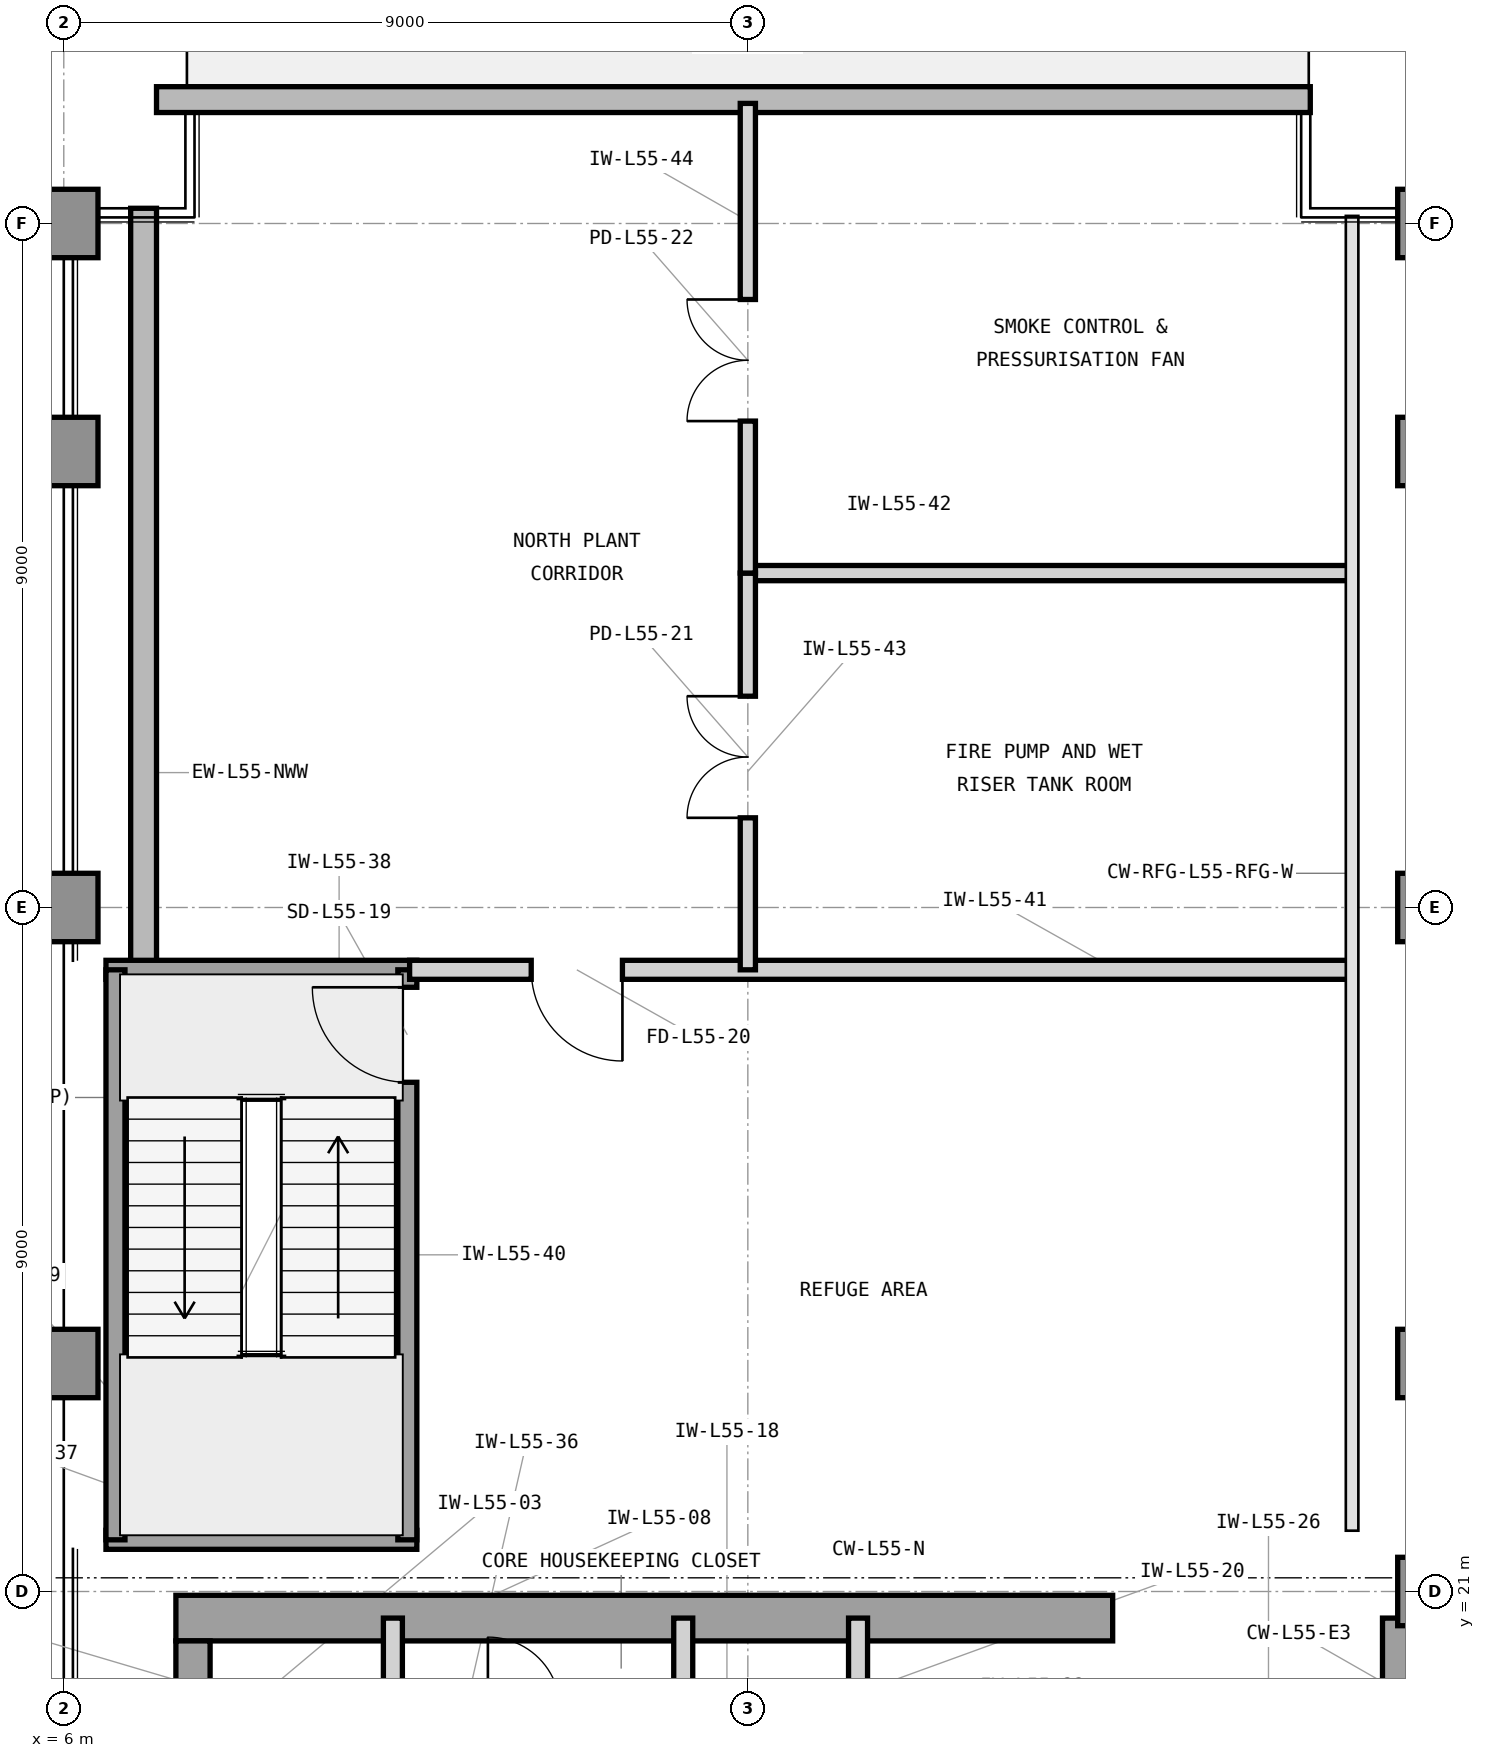
"""IFC4 building model, lengths in metres.
Left out: names, types, materials, properties, quantities, classifications, styles, units other than length and angle.
Written with IfcOpenShell. Run it as: python <this file> out.ifc"""

import sys

from ifc_helpers import new_model, si_unit, direction, frame, frame_2d, origin, origin_2d, place, context, subcontext, project, spatial, rectangle, extrude, element, fill, save


model = new_model("IFC4")
c1 = context("Model", 3, precision=1e-05, world=origin(), true_north=direction((0.0, 1.0)))
c2 = subcontext(c1, "Body", "Model", "MODEL_VIEW")
j1 = project(units=[si_unit("LENGTHUNIT", "METRE"), si_unit("PLANEANGLEUNIT", "RADIAN")], contexts=[c1])
p1 = place(None, origin())
s1 = spatial("IfcSite", under=j1, at=p1, CompositionType="ELEMENT")
p2 = place(p1, origin())
s2 = spatial("IfcBuilding", under=s1, at=p2, CompositionType="ELEMENT")
p3 = place(p2, frame((0.0, 0.0, 226.8)))
s3 = spatial("IfcBuildingStorey", under=s2, at=p3, CompositionType="ELEMENT", Elevation=226.8)
p4 = place(p3, frame((7.475, 20.65, 0.0), z_axis=(0.0, 0.0, 1.0), x_axis=(1.0, 0.0, 0.0)))
e1 = element("IfcWall", 1, at=p4, inside=s3, PredefinedType="SHEAR", context=c2, shape_type="SweptSolid", body=[
    extrude(rectangle(XDim=12.325, YDim=0.6, at=frame_2d((6.163, 0.0))), origin(), (0.0, 0.0, 1.0), 4.5),
])
p5 = place(p3, frame((23.65, 16.6, 0.0), z_axis=(0.0, 0.0, 1.0), x_axis=(0.0, 1.0, 0.0)))
e2 = element("IfcWall", 2, at=p5, inside=s3, PredefinedType="SHEAR", context=c2, shape_type="SweptSolid", body=[
    extrude(rectangle(XDim=4.05, YDim=0.6, at=frame_2d((2.025, 0.0))), origin(), (0.0, 0.0, 1.0), 4.5),
])
p6 = place(p3, frame((7.7, 19.575, 0.0), z_axis=(0.0, 0.0, 1.0), x_axis=(0.0, 1.0, 0.0)))
e3 = element("IfcWall", 3, at=p6, inside=s3, PredefinedType="SHEAR", context=c2, shape_type="SweptSolid", body=[
    extrude(rectangle(XDim=0.775, YDim=0.45, at=frame_2d((0.388, 0.0))), origin(), (0.0, 0.0, 1.0), 4.5),
])
for number, where, z_axis, x_axis in (
    (4, (24.0, 21.0, 0.0), (0.0, 0.0, 1.0), (1.0, 0.0, 0.0)),
    (5, (6.0, 24.0, 0.0), (0.0, 0.0, 1.0), (1.0, 0.0, 0.0)),
    (6, (24.0, 24.0, 0.0), (0.0, 0.0, 1.0), (1.0, 0.0, 0.0)),
    (7, (6.0, 30.0, 0.0), (0.0, 0.0, 1.0), (1.0, 0.0, 0.0)),
    (8, (24.0, 30.0, 0.0), (0.0, 0.0, 1.0), (1.0, 0.0, 0.0)),
    (9, (6.0, 36.0, 0.0), (0.0, 0.0, 1.0), (1.0, 0.0, 0.0)),
    (10, (24.0, 36.0, 0.0), (0.0, 0.0, 1.0), (1.0, 0.0, 0.0)),
    (11, (6.0, 39.0, 0.0), (0.0, 0.0, 1.0), (1.0, 0.0, 0.0)),
    (12, (24.0, 39.0, 0.0), (0.0, 0.0, 1.0), (1.0, 0.0, 0.0)),
):
    element("IfcColumn", number, at=place(p3, frame(where, z_axis=z_axis, x_axis=x_axis)), inside=s3, PredefinedType="COLUMN", context=c2, shape_type="SweptSolid", body=[
        extrude(rectangle(XDim=0.9, YDim=0.9, at=origin_2d()), origin(), (0.0, 0.0, 1.0), 4.5),
    ])
p7 = place(p3, frame((7.05, 39.2, 0.0), z_axis=(0.0, 0.0, 1.0), x_axis=(0.0, -1.0, 0.0)))
e13 = element("IfcWall", 13, at=p7, inside=s3, PredefinedType="STANDARD", context=c2, shape_type="SweptSolid", body=[
    extrude(rectangle(XDim=9.9, YDim=0.34, at=frame_2d((4.95, 0.0))), origin(), (0.0, 0.0, 1.0), 4.3),
])
p8 = place(p3, frame((22.4, 40.63, 0.0), z_axis=(0.0, 0.0, 1.0), x_axis=(-1.0, 0.0, 0.0)))
e14 = element("IfcWall", 14, at=p8, inside=s3, PredefinedType="STANDARD", context=c2, shape_type="SweptSolid", body=[
    extrude(rectangle(XDim=15.18, YDim=0.34, at=frame_2d((7.59, 0.0))), origin(), (0.0, 0.0, 1.0), 4.3),
])
p9 = place(p3, frame((10.33, 19.45, 0.0), z_axis=(0.0, 0.0, 1.0), x_axis=(0.0, 1.0, 0.0)))
e15 = element("IfcWall", 15, at=p9, inside=s3, PredefinedType="PARTITIONING", context=c2, shape_type="SweptSolid", body=[
    extrude(rectangle(XDim=1.2, YDim=0.25, at=frame_2d((0.6, 0.0))), origin(), (0.0, 0.0, 1.0), 4.29),
])
for number, where, z_axis, x_axis in (
    (16, (14.15, 16.7, 0.0), (0.0, 0.0, 1.0), (0.0, 1.0, 0.0)),
    (17, (16.45, 16.7, 0.0), (0.0, 0.0, 1.0), (0.0, 1.0, 0.0)),
):
    element("IfcWall", number, at=place(p3, frame(where, z_axis=z_axis, x_axis=x_axis)), inside=s3, PredefinedType="PARTITIONING", context=c2, shape_type="SweptSolid", body=[
        extrude(rectangle(XDim=3.95, YDim=0.25, at=frame_2d((1.975, 0.0))), origin(), (0.0, 0.0, 1.0), 4.29),
    ])
for number, where, z_axis, x_axis in (
    (18, (6.555, 21.68, 0.0), (0.0, 0.0, 1.0), (1.0, 0.0, 0.0)),
    (19, (6.555, 29.18, 0.0), (0.0, 0.0, 1.0), (1.0, 0.0, 0.0)),
):
    element("IfcWall", number, at=place(p3, frame(where, z_axis=z_axis, x_axis=x_axis)), inside=s3, PredefinedType="SHEAR", context=c2, shape_type="SweptSolid", body=[
        extrude(rectangle(XDim=4.09, YDim=0.25, at=frame_2d((2.045, 0.0))), origin(), (0.0, 0.0, 1.0), 4.5),
    ])
p10 = place(p3, frame((6.68, 21.68, 0.0), z_axis=(0.0, 0.0, 1.0), x_axis=(0.0, 1.0, 0.0)))
e20 = element("IfcWall", 20, at=p10, inside=s3, PredefinedType="SHEAR", context=c2, shape_type="SweptSolid", body=[
    extrude(rectangle(XDim=7.5, YDim=0.25, at=frame_2d((3.75, 0.0))), origin(), (0.0, 0.0, 1.0), 4.5),
])
p11 = place(p3, frame((10.52, 21.68, 0.0), z_axis=(0.0, 0.0, 1.0), x_axis=(0.0, 1.0, 0.0)))
e21 = element("IfcWall", 21, at=p11, inside=s3, PredefinedType="SHEAR", context=c2, shape_type="SweptSolid", body=[
    extrude(rectangle(XDim=7.5, YDim=0.25, at=frame_2d((3.75, 0.0))), origin(), (0.0, 0.0, 1.0), 4.5),
])
p12 = place(p11, frame((6.02, 0.0, 0.0)))
e22 = element("IfcOpeningElement", 22, at=p12, cuts=e21, PredefinedType="OPENING", context=c2, shape_type="SweptSolid", body=[
    extrude(rectangle(XDim=1.25, YDim=2.2, at=frame_2d((0.625, 1.1))), frame((0.0, 0.135, 0.0), z_axis=(0.0, -1.0, 0.0), x_axis=(1.0, 0.0, 0.0)), (0.0, 0.0, 1.0), 0.27),
])
p13 = place(p3, frame((10.55, 29.18, 0.0), z_axis=(0.0, 0.0, 1.0), x_axis=(1.0, 0.0, 0.0)))
e23 = element("IfcWall", 23, at=p13, inside=s3, PredefinedType="PARTITIONING", context=c2, shape_type="SweptSolid", body=[
    extrude(rectangle(XDim=12.4, YDim=0.25, at=frame_2d((6.2, 0.0))), origin(), (0.0, 0.0, 1.0), 4.29),
])
p14 = place(p13, frame((1.6, 0.0, 0.0)))
e24 = element("IfcOpeningElement", 24, at=p14, cuts=e23, PredefinedType="OPENING", context=c2, shape_type="SweptSolid", body=[
    extrude(rectangle(XDim=1.2, YDim=2.2, at=frame_2d((0.6, 1.1))), frame((0.0, 0.135, 0.0), z_axis=(0.0, -1.0, 0.0), x_axis=(1.0, 0.0, 0.0)), (0.0, 0.0, 1.0), 0.27),
])
p15 = place(p3, frame((15.0, 34.4, 0.0), z_axis=(0.0, 0.0, 1.0), x_axis=(1.0, 0.0, 0.0)))
e25 = element("IfcWall", 25, at=p15, inside=s3, PredefinedType="PARTITIONING", context=c2, shape_type="SweptSolid", body=[
    extrude(rectangle(XDim=7.95, YDim=0.2, at=frame_2d((3.975, 0.0))), origin(), (0.0, 0.0, 1.0), 4.29),
])
p16 = place(p3, frame((15.0, 29.18, 0.0), z_axis=(0.0, 0.0, 1.0), x_axis=(0.0, 1.0, 0.0)))
e26 = element("IfcWall", 26, at=p16, inside=s3, PredefinedType="PARTITIONING", context=c2, shape_type="SweptSolid", body=[
    extrude(rectangle(XDim=5.22, YDim=0.2, at=frame_2d((2.61, 0.0))), origin(), (0.0, 0.0, 1.0), 3.886),
])
p17 = place(p16, frame((2.0, 0.0, 0.0)))
e27 = element("IfcOpeningElement", 27, at=p17, cuts=e26, PredefinedType="OPENING", context=c2, shape_type="SweptSolid", body=[
    extrude(rectangle(XDim=1.6, YDim=2.3, at=frame_2d((0.8, 1.15))), frame((0.0, 0.11, 0.0), z_axis=(0.0, -1.0, 0.0), x_axis=(1.0, 0.0, 0.0)), (0.0, 0.0, 1.0), 0.22),
])
p18 = place(p3, frame((15.0, 34.4, 0.0), z_axis=(0.0, 0.0, 1.0), x_axis=(0.0, 1.0, 0.0)))
e28 = element("IfcWall", 28, at=p18, inside=s3, PredefinedType="PARTITIONING", context=c2, shape_type="SweptSolid", body=[
    extrude(rectangle(XDim=6.18, YDim=0.2, at=frame_2d((3.09, 0.0))), origin(), (0.0, 0.0, 1.0), 3.886),
])
p19 = place(p18, frame((2.0, 0.0, 0.0)))
e29 = element("IfcOpeningElement", 29, at=p19, cuts=e28, PredefinedType="OPENING", context=c2, shape_type="SweptSolid", body=[
    extrude(rectangle(XDim=1.6, YDim=2.3, at=frame_2d((0.8, 1.15))), frame((0.0, 0.11, 0.0), z_axis=(0.0, -1.0, 0.0), x_axis=(1.0, 0.0, 0.0)), (0.0, 0.0, 1.0), 0.22),
])
p20 = place(p12, origin())
e30 = element("IfcDoor", 30, at=p20, inside=s3, OperationType="SINGLE_SWING_RIGHT", PredefinedType="DOOR", context=c2, shape_type="SweptSolid", body=[
    extrude(rectangle(XDim=1.25, YDim=2.2, at=frame_2d((0.625, 1.1))), frame((0.0, 0.025, 0.0), z_axis=(0.0, -1.0, 0.0), x_axis=(1.0, 0.0, 0.0)), (0.0, 0.0, 1.0), 0.05),
])
fill(e22, e30)
p21 = place(p14, frame((1.2, 0.0, 0.0), z_axis=(0.0, 0.0, 1.0), x_axis=(-1.0, 0.0, 0.0)))
e31 = element("IfcDoor", 31, at=p21, inside=s3, OperationType="SINGLE_SWING_LEFT", PredefinedType="DOOR", context=c2, shape_type="SweptSolid", body=[
    extrude(rectangle(XDim=1.2, YDim=2.2, at=frame_2d((0.6, 1.1))), frame((0.0, 0.025, 0.0), z_axis=(0.0, -1.0, 0.0), x_axis=(1.0, 0.0, 0.0)), (0.0, 0.0, 1.0), 0.05),
])
fill(e24, e31)
p22 = place(p17, origin())
e32 = element("IfcDoor", 32, at=p22, inside=s3, OperationType="DOUBLE_DOOR_SINGLE_SWING", PredefinedType="DOOR", context=c2, shape_type="SweptSolid", body=[
    extrude(rectangle(XDim=1.6, YDim=2.3, at=frame_2d((0.8, 1.15))), frame((0.0, 0.025, 0.0), z_axis=(0.0, -1.0, 0.0), x_axis=(1.0, 0.0, 0.0)), (0.0, 0.0, 1.0), 0.05),
])
fill(e27, e32)
p23 = place(p19, origin())
e33 = element("IfcDoor", 33, at=p23, inside=s3, OperationType="DOUBLE_DOOR_SINGLE_SWING", PredefinedType="DOOR", context=c2, shape_type="SweptSolid", body=[
    extrude(rectangle(XDim=1.6, YDim=2.3, at=frame_2d((0.8, 1.15))), frame((0.0, 0.025, 0.0), z_axis=(0.0, -1.0, 0.0), x_axis=(1.0, 0.0, 0.0)), (0.0, 0.0, 1.0), 0.05),
])
fill(e29, e33)
save(model, sys.argv[1])
